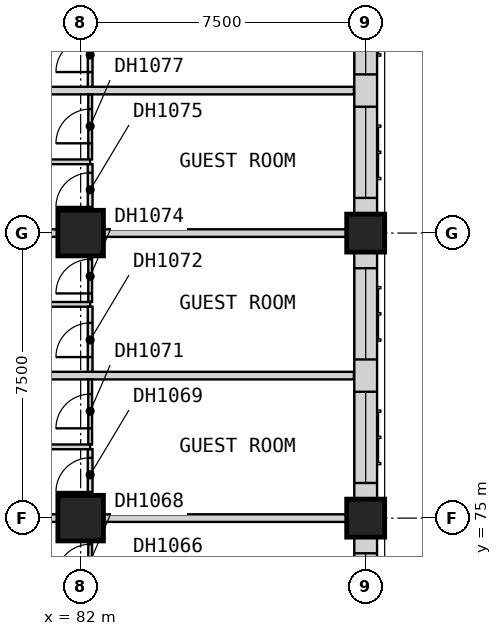
"""IFC4 building model, lengths in metres.
Left out: names, types, materials, properties, quantities, classifications, styles, units other than length and angle.
Written with IfcOpenShell. Run it as: python <this file> out.ifc"""

import sys

from ifc_helpers import new_model, si_unit, direction, frame, frame_2d, origin, origin_2d, place, context, subcontext, project, spatial, rectangle, extrude, element, fill, save


model = new_model("IFC4")
c1 = context("Model", 3, precision=1e-05, world=origin(), true_north=direction((0.0, 1.0)))
c2 = subcontext(c1, "Body", "Model", "MODEL_VIEW")
j1 = project(units=[si_unit("LENGTHUNIT", "METRE"), si_unit("PLANEANGLEUNIT", "RADIAN")], contexts=[c1])
p1 = place(None, origin())
s1 = spatial("IfcSite", under=j1, at=p1, CompositionType="ELEMENT")
p2 = place(p1, origin())
s2 = spatial("IfcBuilding", under=s1, at=p2, CompositionType="ELEMENT")
p3 = place(p2, frame((0.0, 0.0, 34.0)))
s3 = spatial("IfcBuildingStorey", under=s2, at=p3, CompositionType="ELEMENT", Elevation=34.0)
for number, where, z_axis, x_axis in (
    (1, (82.0, 75.0, 0.0), (0.0, 0.0, 1.0), (1.0, 0.0, 0.0)),
    (2, (82.0, 82.5, 0.0), (0.0, 0.0, 1.0), (1.0, 0.0, 0.0)),
):
    element("IfcColumn", number, at=place(p3, frame(where, z_axis=z_axis, x_axis=x_axis)), inside=s3, PredefinedType="COLUMN", context=c2, shape_type="SweptSolid", body=[
        extrude(rectangle(XDim=1.2, YDim=1.2, at=origin_2d()), origin(), (0.0, 0.0, 1.0), 3.6),
    ])
for number, where, z_axis, x_axis in (
    (3, (89.5, 75.0, 0.0), (0.0, 0.0, 1.0), (1.0, 0.0, 0.0)),
    (4, (89.5, 82.5, 0.0), (0.0, 0.0, 1.0), (1.0, 0.0, 0.0)),
):
    element("IfcColumn", number, at=place(p3, frame(where, z_axis=z_axis, x_axis=x_axis)), inside=s3, PredefinedType="COLUMN", context=c2, shape_type="SweptSolid", body=[
        extrude(rectangle(XDim=1.0, YDim=1.0, at=origin_2d()), origin(), (0.0, 0.0, 1.0), 3.6),
    ])
p4 = place(p3, frame((89.5, 68.0, 0.0), z_axis=(0.0, 0.0, 1.0), x_axis=(0.0, 1.0, 0.0)))
e5 = element("IfcWall", 5, at=p4, inside=s3, PredefinedType="SOLIDWALL", context=c2, shape_type="SweptSolid", body=[
    extrude(rectangle(XDim=6.5, YDim=0.6, at=frame_2d((3.25, 0.0))), origin(), (0.0, 0.0, 1.0), 2.85),
])
p5 = place(p4, frame((0.475, 0.0, 0.0)))
e6 = element("IfcOpeningElement", 6, at=p5, cuts=e5, PredefinedType="OPENING", context=c2, shape_type="SweptSolid", body=[
    extrude(rectangle(XDim=1.8, YDim=2.4, at=frame_2d((0.9, 1.2))), frame((0.0, 0.31, 0.0), z_axis=(0.0, -1.0, 0.0), x_axis=(1.0, 0.0, 0.0)), (0.0, 0.0, 1.0), 0.62),
])
p6 = place(p4, frame((3.675, 0.0, 0.8)))
e7 = element("IfcOpeningElement", 7, at=p6, cuts=e5, PredefinedType="OPENING", context=c2, shape_type="SweptSolid", body=[
    extrude(rectangle(XDim=2.4, YDim=1.8, at=frame_2d((1.2, 0.9))), frame((0.0, 0.31, 0.0), z_axis=(0.0, -1.0, 0.0), x_axis=(1.0, 0.0, 0.0)), (0.0, 0.0, 1.0), 0.62),
])
p7 = place(p3, frame((89.5, 75.5, 0.0), z_axis=(0.0, 0.0, 1.0), x_axis=(0.0, 1.0, 0.0)))
e8 = element("IfcWall", 8, at=p7, inside=s3, PredefinedType="SOLIDWALL", context=c2, shape_type="SweptSolid", body=[
    extrude(rectangle(XDim=6.5, YDim=0.6, at=frame_2d((3.25, 0.0))), origin(), (0.0, 0.0, 1.0), 2.85),
])
p8 = place(p7, frame((0.425, 0.0, 0.8)))
e9 = element("IfcOpeningElement", 9, at=p8, cuts=e8, PredefinedType="OPENING", context=c2, shape_type="SweptSolid", body=[
    extrude(rectangle(XDim=2.4, YDim=1.8, at=frame_2d((1.2, 0.9))), frame((0.0, 0.31, 0.0), z_axis=(0.0, -1.0, 0.0), x_axis=(1.0, 0.0, 0.0)), (0.0, 0.0, 1.0), 0.62),
])
p9 = place(p7, frame((3.675, 0.0, 0.8)))
e10 = element("IfcOpeningElement", 10, at=p9, cuts=e8, PredefinedType="OPENING", context=c2, shape_type="SweptSolid", body=[
    extrude(rectangle(XDim=2.4, YDim=1.8, at=frame_2d((1.2, 0.9))), frame((0.0, 0.31, 0.0), z_axis=(0.0, -1.0, 0.0), x_axis=(1.0, 0.0, 0.0)), (0.0, 0.0, 1.0), 0.62),
])
p10 = place(p3, frame((89.5, 83.0, 0.0), z_axis=(0.0, 0.0, 1.0), x_axis=(0.0, 1.0, 0.0)))
e11 = element("IfcWall", 11, at=p10, inside=s3, PredefinedType="SOLIDWALL", context=c2, shape_type="SweptSolid", body=[
    extrude(rectangle(XDim=6.5, YDim=0.6, at=frame_2d((3.25, 0.0))), origin(), (0.0, 0.0, 1.0), 2.85),
])
p11 = place(p10, frame((0.425, 0.0, 0.8)))
e12 = element("IfcOpeningElement", 12, at=p11, cuts=e11, PredefinedType="OPENING", context=c2, shape_type="SweptSolid", body=[
    extrude(rectangle(XDim=2.4, YDim=1.8, at=frame_2d((1.2, 0.9))), frame((0.0, 0.31, 0.0), z_axis=(0.0, -1.0, 0.0), x_axis=(1.0, 0.0, 0.0)), (0.0, 0.0, 1.0), 0.62),
])
p12 = place(p10, frame((3.675, 0.0, 0.8)))
e13 = element("IfcOpeningElement", 13, at=p12, cuts=e11, PredefinedType="OPENING", context=c2, shape_type="SweptSolid", body=[
    extrude(rectangle(XDim=2.4, YDim=1.8, at=frame_2d((1.2, 0.9))), frame((0.0, 0.31, 0.0), z_axis=(0.0, -1.0, 0.0), x_axis=(1.0, 0.0, 0.0)), (0.0, 0.0, 1.0), 0.62),
])
p13 = place(p3, frame((77.475, 75.0, 0.0), z_axis=(0.0, 0.0, 1.0), x_axis=(1.0, 0.0, 0.0)))
e14 = element("IfcWall", 14, at=p13, inside=s3, PredefinedType="PARTITIONING", context=c2, shape_type="SweptSolid", body=[
    extrude(rectangle(XDim=12.525, YDim=0.2, at=frame_2d((6.262, 0.0))), origin(), (0.0, 0.0, 1.0), 3.35),
])
p14 = place(p3, frame((77.475, 78.75, 0.0), z_axis=(0.0, 0.0, 1.0), x_axis=(1.0, 0.0, 0.0)))
e15 = element("IfcWall", 15, at=p14, inside=s3, PredefinedType="PARTITIONING", context=c2, shape_type="SweptSolid", body=[
    extrude(rectangle(XDim=11.715, YDim=0.2, at=frame_2d((5.857, 0.0))), origin(), (0.0, 0.0, 1.0), 3.35),
])
p15 = place(p3, frame((77.475, 82.5, 0.0), z_axis=(0.0, 0.0, 1.0), x_axis=(1.0, 0.0, 0.0)))
e16 = element("IfcWall", 16, at=p15, inside=s3, PredefinedType="PARTITIONING", context=c2, shape_type="SweptSolid", body=[
    extrude(rectangle(XDim=12.525, YDim=0.2, at=frame_2d((6.262, 0.0))), origin(), (0.0, 0.0, 1.0), 3.35),
])
p16 = place(p3, frame((77.475, 86.25, 0.0), z_axis=(0.0, 0.0, 1.0), x_axis=(1.0, 0.0, 0.0)))
e17 = element("IfcWall", 17, at=p16, inside=s3, PredefinedType="PARTITIONING", context=c2, shape_type="SweptSolid", body=[
    extrude(rectangle(XDim=11.715, YDim=0.2, at=frame_2d((5.857, 0.0))), origin(), (0.0, 0.0, 1.0), 3.35),
])
p17 = place(p3, frame((82.25, 73.188, 0.0), z_axis=(0.0, 0.0, 1.0), x_axis=(0.0, 1.0, 0.0)))
e18 = element("IfcWall", 18, at=p17, inside=s3, PredefinedType="PARTITIONING", context=c2, shape_type="SweptSolid", body=[
    extrude(rectangle(XDim=1.712, YDim=0.1, at=frame_2d((0.856, 0.0))), origin(), (0.0, 0.0, 1.0), 3.35),
])
p18 = place(p17, frame((0.225, 0.0, 0.0)))
e19 = element("IfcOpeningElement", 19, at=p18, cuts=e18, PredefinedType="OPENING", context=c2, shape_type="SweptSolid", body=[
    extrude(rectangle(XDim=0.9, YDim=2.1, at=frame_2d((0.45, 1.05))), frame((0.0, 0.06, 0.0), z_axis=(0.0, -1.0, 0.0), x_axis=(1.0, 0.0, 0.0)), (0.0, 0.0, 1.0), 0.12),
])
p19 = place(p3, frame((82.25, 76.938, 0.0), z_axis=(0.0, 0.0, 1.0), x_axis=(0.0, 1.0, 0.0)))
e20 = element("IfcWall", 20, at=p19, inside=s3, PredefinedType="PARTITIONING", context=c2, shape_type="SweptSolid", body=[
    extrude(rectangle(XDim=1.712, YDim=0.1, at=frame_2d((0.856, 0.0))), origin(), (0.0, 0.0, 1.0), 3.35),
])
p20 = place(p19, frame((0.425, 0.0, 0.0)))
e21 = element("IfcOpeningElement", 21, at=p20, cuts=e20, PredefinedType="OPENING", context=c2, shape_type="SweptSolid", body=[
    extrude(rectangle(XDim=0.9, YDim=2.1, at=frame_2d((0.45, 1.05))), frame((0.0, 0.06, 0.0), z_axis=(0.0, -1.0, 0.0), x_axis=(1.0, 0.0, 0.0)), (0.0, 0.0, 1.0), 0.12),
])
p21 = place(p3, frame((82.25, 80.688, 0.0), z_axis=(0.0, 0.0, 1.0), x_axis=(0.0, 1.0, 0.0)))
e22 = element("IfcWall", 22, at=p21, inside=s3, PredefinedType="PARTITIONING", context=c2, shape_type="SweptSolid", body=[
    extrude(rectangle(XDim=1.712, YDim=0.1, at=frame_2d((0.856, 0.0))), origin(), (0.0, 0.0, 1.0), 3.35),
])
p22 = place(p21, frame((0.225, 0.0, 0.0)))
e23 = element("IfcOpeningElement", 23, at=p22, cuts=e22, PredefinedType="OPENING", context=c2, shape_type="SweptSolid", body=[
    extrude(rectangle(XDim=0.9, YDim=2.1, at=frame_2d((0.45, 1.05))), frame((0.0, 0.06, 0.0), z_axis=(0.0, -1.0, 0.0), x_axis=(1.0, 0.0, 0.0)), (0.0, 0.0, 1.0), 0.12),
])
p23 = place(p3, frame((82.25, 84.438, 0.0), z_axis=(0.0, 0.0, 1.0), x_axis=(0.0, 1.0, 0.0)))
e24 = element("IfcWall", 24, at=p23, inside=s3, PredefinedType="PARTITIONING", context=c2, shape_type="SweptSolid", body=[
    extrude(rectangle(XDim=1.712, YDim=0.1, at=frame_2d((0.856, 0.0))), origin(), (0.0, 0.0, 1.0), 3.35),
])
p24 = place(p23, frame((0.425, 0.0, 0.0)))
e25 = element("IfcOpeningElement", 25, at=p24, cuts=e24, PredefinedType="OPENING", context=c2, shape_type="SweptSolid", body=[
    extrude(rectangle(XDim=0.9, YDim=2.1, at=frame_2d((0.45, 1.05))), frame((0.0, 0.06, 0.0), z_axis=(0.0, -1.0, 0.0), x_axis=(1.0, 0.0, 0.0)), (0.0, 0.0, 1.0), 0.12),
])
for number, where, z_axis, x_axis in (
    (26, (77.475, 76.875, 0.0), (0.0, 0.0, 1.0), (1.0, 0.0, 0.0)),
    (27, (77.475, 80.625, 0.0), (0.0, 0.0, 1.0), (1.0, 0.0, 0.0)),
    (28, (77.475, 84.375, 0.0), (0.0, 0.0, 1.0), (1.0, 0.0, 0.0)),
):
    element("IfcWall", number, at=place(p3, frame(where, z_axis=z_axis, x_axis=x_axis)), inside=s3, PredefinedType="PARTITIONING", context=c2, shape_type="SweptSolid", body=[
        extrude(rectangle(XDim=4.775, YDim=0.125, at=frame_2d((2.387, 0.0))), origin(), (0.0, 0.0, 1.0), 3.35),
    ])
p25 = place(p3, frame((82.25, 75.1, 0.0), z_axis=(0.0, 0.0, 1.0), x_axis=(0.0, 1.0, 0.0)))
e29 = element("IfcWall", 29, at=p25, inside=s3, PredefinedType="PARTITIONING", context=c2, shape_type="SweptSolid", body=[
    extrude(rectangle(XDim=1.712, YDim=0.125, at=frame_2d((0.856, 0.0))), origin(), (0.0, 0.0, 1.0), 3.35),
])
p26 = place(p25, frame((0.587, 0.0, 0.0)))
e30 = element("IfcOpeningElement", 30, at=p26, cuts=e29, PredefinedType="OPENING", context=c2, shape_type="SweptSolid", body=[
    extrude(rectangle(XDim=0.9, YDim=2.1, at=frame_2d((0.45, 1.05))), frame((0.0, 0.073, 0.0), z_axis=(0.0, -1.0, 0.0), x_axis=(1.0, 0.0, 0.0)), (0.0, 0.0, 1.0), 0.145),
])
p27 = place(p3, frame((82.25, 78.85, 0.0), z_axis=(0.0, 0.0, 1.0), x_axis=(0.0, 1.0, 0.0)))
e31 = element("IfcWall", 31, at=p27, inside=s3, PredefinedType="PARTITIONING", context=c2, shape_type="SweptSolid", body=[
    extrude(rectangle(XDim=1.712, YDim=0.125, at=frame_2d((0.856, 0.0))), origin(), (0.0, 0.0, 1.0), 3.35),
])
p28 = place(p27, frame((0.387, 0.0, 0.0)))
e32 = element("IfcOpeningElement", 32, at=p28, cuts=e31, PredefinedType="OPENING", context=c2, shape_type="SweptSolid", body=[
    extrude(rectangle(XDim=0.9, YDim=2.1, at=frame_2d((0.45, 1.05))), frame((0.0, 0.073, 0.0), z_axis=(0.0, -1.0, 0.0), x_axis=(1.0, 0.0, 0.0)), (0.0, 0.0, 1.0), 0.145),
])
p29 = place(p3, frame((82.25, 82.6, 0.0), z_axis=(0.0, 0.0, 1.0), x_axis=(0.0, 1.0, 0.0)))
e33 = element("IfcWall", 33, at=p29, inside=s3, PredefinedType="PARTITIONING", context=c2, shape_type="SweptSolid", body=[
    extrude(rectangle(XDim=1.712, YDim=0.125, at=frame_2d((0.856, 0.0))), origin(), (0.0, 0.0, 1.0), 3.35),
])
p30 = place(p29, frame((0.587, 0.0, 0.0)))
e34 = element("IfcOpeningElement", 34, at=p30, cuts=e33, PredefinedType="OPENING", context=c2, shape_type="SweptSolid", body=[
    extrude(rectangle(XDim=0.9, YDim=2.1, at=frame_2d((0.45, 1.05))), frame((0.0, 0.073, 0.0), z_axis=(0.0, -1.0, 0.0), x_axis=(1.0, 0.0, 0.0)), (0.0, 0.0, 1.0), 0.145),
])
p31 = place(p3, frame((82.25, 86.35, 0.0), z_axis=(0.0, 0.0, 1.0), x_axis=(0.0, 1.0, 0.0)))
e35 = element("IfcWall", 35, at=p31, inside=s3, PredefinedType="PARTITIONING", context=c2, shape_type="SweptSolid", body=[
    extrude(rectangle(XDim=1.712, YDim=0.125, at=frame_2d((0.856, 0.0))), origin(), (0.0, 0.0, 1.0), 3.35),
])
p32 = place(p31, frame((0.387, 0.0, 0.0)))
e36 = element("IfcOpeningElement", 36, at=p32, cuts=e35, PredefinedType="OPENING", context=c2, shape_type="SweptSolid", body=[
    extrude(rectangle(XDim=0.9, YDim=2.1, at=frame_2d((0.45, 1.05))), frame((0.0, 0.073, 0.0), z_axis=(0.0, -1.0, 0.0), x_axis=(1.0, 0.0, 0.0)), (0.0, 0.0, 1.0), 0.145),
])
p33 = place(p6, origin())
e37 = element("IfcWindow", 37, at=p33, inside=s3, PartitioningType="SINGLE_PANEL", PredefinedType="WINDOW", context=c2, shape_type="SweptSolid", body=[
    extrude(rectangle(XDim=2.4, YDim=1.8, at=frame_2d((1.2, 0.9))), frame((0.0, -0.07, 0.0), z_axis=(0.0, -1.0, 0.0), x_axis=(1.0, 0.0, 0.0)), (0.0, 0.0, 1.0), 0.06),
])
fill(e7, e37)
p34 = place(p8, origin())
e38 = element("IfcWindow", 38, at=p34, inside=s3, PartitioningType="SINGLE_PANEL", PredefinedType="WINDOW", context=c2, shape_type="SweptSolid", body=[
    extrude(rectangle(XDim=2.4, YDim=1.8, at=frame_2d((1.2, 0.9))), frame((0.0, -0.07, 0.0), z_axis=(0.0, -1.0, 0.0), x_axis=(1.0, 0.0, 0.0)), (0.0, 0.0, 1.0), 0.06),
])
fill(e9, e38)
p35 = place(p9, origin())
e39 = element("IfcWindow", 39, at=p35, inside=s3, PartitioningType="SINGLE_PANEL", PredefinedType="WINDOW", context=c2, shape_type="SweptSolid", body=[
    extrude(rectangle(XDim=2.4, YDim=1.8, at=frame_2d((1.2, 0.9))), frame((0.0, -0.07, 0.0), z_axis=(0.0, -1.0, 0.0), x_axis=(1.0, 0.0, 0.0)), (0.0, 0.0, 1.0), 0.06),
])
fill(e10, e39)
p36 = place(p11, origin())
e40 = element("IfcWindow", 40, at=p36, inside=s3, PartitioningType="SINGLE_PANEL", PredefinedType="WINDOW", context=c2, shape_type="SweptSolid", body=[
    extrude(rectangle(XDim=2.4, YDim=1.8, at=frame_2d((1.2, 0.9))), frame((0.0, -0.07, 0.0), z_axis=(0.0, -1.0, 0.0), x_axis=(1.0, 0.0, 0.0)), (0.0, 0.0, 1.0), 0.06),
])
fill(e12, e40)
p37 = place(p12, origin())
e41 = element("IfcWindow", 41, at=p37, inside=s3, PartitioningType="SINGLE_PANEL", PredefinedType="WINDOW", context=c2, shape_type="SweptSolid", body=[
    extrude(rectangle(XDim=2.4, YDim=1.8, at=frame_2d((1.2, 0.9))), frame((0.0, -0.07, 0.0), z_axis=(0.0, -1.0, 0.0), x_axis=(1.0, 0.0, 0.0)), (0.0, 0.0, 1.0), 0.06),
])
fill(e13, e41)
p38 = place(p18, origin())
e42 = element("IfcDoor", 42, at=p38, inside=s3, OperationType="SINGLE_SWING_LEFT", PredefinedType="DOOR", context=c2, shape_type="SweptSolid", body=[
    extrude(rectangle(XDim=0.9, YDim=2.1, at=frame_2d((0.45, 1.05))), frame((0.0, 0.025, 0.0), z_axis=(0.0, -1.0, 0.0), x_axis=(1.0, 0.0, 0.0)), (0.0, 0.0, 1.0), 0.05),
])
fill(e19, e42)
p39 = place(p26, origin())
e43 = element("IfcDoor", 43, at=p39, inside=s3, OperationType="SINGLE_SWING_RIGHT", PredefinedType="DOOR", context=c2, shape_type="SweptSolid", body=[
    extrude(rectangle(XDim=0.9, YDim=2.1, at=frame_2d((0.45, 1.05))), frame((0.0, 0.025, 0.0), z_axis=(0.0, -1.0, 0.0), x_axis=(1.0, 0.0, 0.0)), (0.0, 0.0, 1.0), 0.05),
])
fill(e30, e43)
p40 = place(p20, origin())
e44 = element("IfcDoor", 44, at=p40, inside=s3, OperationType="SINGLE_SWING_LEFT", PredefinedType="DOOR", context=c2, shape_type="SweptSolid", body=[
    extrude(rectangle(XDim=0.9, YDim=2.1, at=frame_2d((0.45, 1.05))), frame((0.0, 0.025, 0.0), z_axis=(0.0, -1.0, 0.0), x_axis=(1.0, 0.0, 0.0)), (0.0, 0.0, 1.0), 0.05),
])
fill(e21, e44)
p41 = place(p28, origin())
e45 = element("IfcDoor", 45, at=p41, inside=s3, OperationType="SINGLE_SWING_LEFT", PredefinedType="DOOR", context=c2, shape_type="SweptSolid", body=[
    extrude(rectangle(XDim=0.9, YDim=2.1, at=frame_2d((0.45, 1.05))), frame((0.0, 0.025, 0.0), z_axis=(0.0, -1.0, 0.0), x_axis=(1.0, 0.0, 0.0)), (0.0, 0.0, 1.0), 0.05),
])
fill(e32, e45)
p42 = place(p22, origin())
e46 = element("IfcDoor", 46, at=p42, inside=s3, OperationType="SINGLE_SWING_LEFT", PredefinedType="DOOR", context=c2, shape_type="SweptSolid", body=[
    extrude(rectangle(XDim=0.9, YDim=2.1, at=frame_2d((0.45, 1.05))), frame((0.0, 0.025, 0.0), z_axis=(0.0, -1.0, 0.0), x_axis=(1.0, 0.0, 0.0)), (0.0, 0.0, 1.0), 0.05),
])
fill(e23, e46)
p43 = place(p30, origin())
e47 = element("IfcDoor", 47, at=p43, inside=s3, OperationType="SINGLE_SWING_RIGHT", PredefinedType="DOOR", context=c2, shape_type="SweptSolid", body=[
    extrude(rectangle(XDim=0.9, YDim=2.1, at=frame_2d((0.45, 1.05))), frame((0.0, 0.025, 0.0), z_axis=(0.0, -1.0, 0.0), x_axis=(1.0, 0.0, 0.0)), (0.0, 0.0, 1.0), 0.05),
])
fill(e34, e47)
p44 = place(p24, origin())
e48 = element("IfcDoor", 48, at=p44, inside=s3, OperationType="SINGLE_SWING_LEFT", PredefinedType="DOOR", context=c2, shape_type="SweptSolid", body=[
    extrude(rectangle(XDim=0.9, YDim=2.1, at=frame_2d((0.45, 1.05))), frame((0.0, 0.025, 0.0), z_axis=(0.0, -1.0, 0.0), x_axis=(1.0, 0.0, 0.0)), (0.0, 0.0, 1.0), 0.05),
])
fill(e25, e48)
p45 = place(p32, origin())
e49 = element("IfcDoor", 49, at=p45, inside=s3, OperationType="SINGLE_SWING_LEFT", PredefinedType="DOOR", context=c2, shape_type="SweptSolid", body=[
    extrude(rectangle(XDim=0.9, YDim=2.1, at=frame_2d((0.45, 1.05))), frame((0.0, 0.025, 0.0), z_axis=(0.0, -1.0, 0.0), x_axis=(1.0, 0.0, 0.0)), (0.0, 0.0, 1.0), 0.05),
])
fill(e36, e49)
save(model, sys.argv[1])
